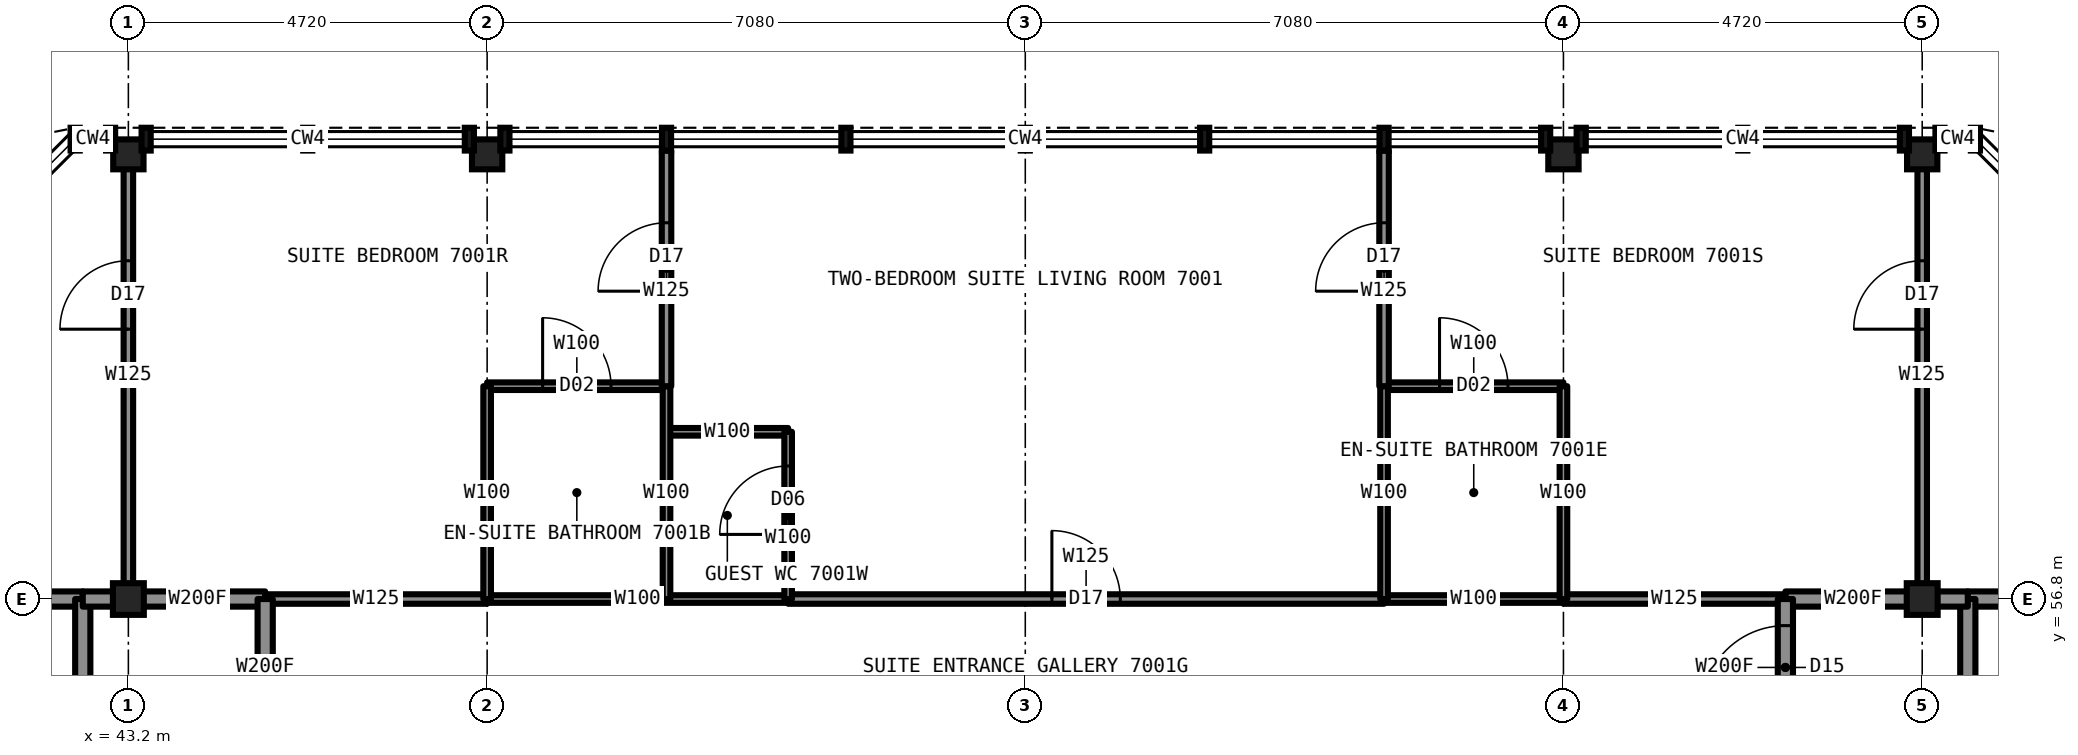
"""IFC4 building model, lengths in metres.
Left out: names, types, materials, properties, quantities, classifications, styles, units other than length and angle.
Written with IfcOpenShell. Run it as: python <this file> out.ifc"""

import sys

from ifc_helpers import new_model, si_unit, direction, frame, frame_2d, origin, origin_2d, place, context, subcontext, project, spatial, rectangle, i_section, extrude, element, fill, save


model = new_model("IFC4")
c1 = context("Model", 3, precision=1e-05, world=origin(), true_north=direction((0.0, 1.0)))
c2 = subcontext(c1, "Body", "Model", "MODEL_VIEW")
j1 = project(units=[si_unit("LENGTHUNIT", "METRE"), si_unit("PLANEANGLEUNIT", "RADIAN")], contexts=[c1])
p1 = place(None, origin())
s1 = spatial("IfcSite", under=j1, at=p1, CompositionType="ELEMENT")
p2 = place(p1, origin())
s2 = spatial("IfcBuilding", under=s1, at=p2, CompositionType="ELEMENT")
p3 = place(p2, frame((0.0, 0.0, 254.7)))
s3 = spatial("IfcBuildingStorey", under=s2, at=p3, CompositionType="ELEMENT", Elevation=254.7)
for number, where, z_axis, x_axis in (
    (1, (43.2, 62.65, 0.0), (0.0, 0.0, 1.0), (1.0, 0.0, 0.0)),
    (2, (47.92, 62.65, 0.0), (0.0, 0.0, 1.0), (1.0, 0.0, 0.0)),
    (3, (62.08, 62.65, 0.0), (0.0, 0.0, 1.0), (1.0, 0.0, 0.0)),
    (4, (66.8, 62.65, 0.0), (0.0, 0.0, 1.0), (1.0, 0.0, 0.0)),
):
    element("IfcColumn", number, at=place(p3, frame(where, z_axis=z_axis, x_axis=x_axis)), inside=s3, PredefinedType="COLUMN", context=c2, shape_type="SweptSolid", body=[
        extrude(i_section(OverallWidth=0.399, OverallDepth=0.394, WebThickness=0.023, FlangeThickness=0.037, at=origin_2d()), origin(), (0.0, 0.0, 1.0), 3.5),
    ])
for number, where, z_axis, x_axis in (
    (5, (43.2, 56.8, 0.0), (0.0, 0.0, 1.0), (1.0, 0.0, 0.0)),
    (6, (66.8, 56.8, 0.0), (0.0, 0.0, 1.0), (1.0, 0.0, 0.0)),
):
    element("IfcColumn", number, at=place(p3, frame(where, z_axis=z_axis, x_axis=x_axis)), inside=s3, PredefinedType="COLUMN", context=c2, shape_type="SweptSolid", body=[
        extrude(i_section(OverallWidth=0.406, OverallDepth=0.417, WebThickness=0.03, FlangeThickness=0.048, at=origin_2d()), origin(), (0.0, 0.0, 1.0), 3.5),
    ])
p4 = place(p3, frame((47.92, 56.8, 0.0), z_axis=(0.0, 0.0, 1.0), x_axis=(1.0, 0.0, 0.0)))
e7 = element("IfcWall", 7, at=p4, inside=s3, PredefinedType="PARTITIONING", context=c2, shape_type="SweptSolid", body=[
    extrude(rectangle(XDim=3.96, YDim=0.1, at=frame_2d((1.98, 0.0))), origin(), (0.0, 0.0, 1.0), 3.33),
])
p5 = place(p3, frame((59.72, 56.8, 0.0), z_axis=(0.0, 0.0, 1.0), x_axis=(1.0, 0.0, 0.0)))
e8 = element("IfcWall", 8, at=p5, inside=s3, PredefinedType="PARTITIONING", context=c2, shape_type="SweptSolid", body=[
    extrude(rectangle(XDim=2.36, YDim=0.1, at=frame_2d((1.18, 0.0))), origin(), (0.0, 0.0, 1.0), 3.33),
])
for number, where, z_axis, x_axis in (
    (9, (43.22, 56.8, 0.0), (0.0, 0.0, 1.0), (1.0, 0.0, 0.0)),
    (10, (65.0, 56.8, 0.0), (0.0, 0.0, 1.0), (1.0, 0.0, 0.0)),
):
    element("IfcWall", number, at=place(p3, frame(where, z_axis=z_axis, x_axis=x_axis)), inside=s3, PredefinedType="PARTITIONING", context=c2, shape_type="SweptSolid", body=[
        extrude(rectangle(XDim=1.78, YDim=0.2, at=frame_2d((0.89, 0.0))), origin(), (0.0, 0.0, 1.0), 3.33),
    ])
for number, where, z_axis, x_axis in (
    (11, (37.3, 56.8, 0.0), (0.0, 0.0, 1.0), (1.0, 0.0, 0.0)),
    (12, (67.4, 56.8, 0.0), (0.0, 0.0, 1.0), (1.0, 0.0, 0.0)),
):
    element("IfcWall", number, at=place(p3, frame(where, z_axis=z_axis, x_axis=x_axis)), inside=s3, PredefinedType="PARTITIONING", context=c2, shape_type="SweptSolid", body=[
        extrude(rectangle(XDim=5.3, YDim=0.2, at=frame_2d((2.65, 0.0))), origin(), (0.0, 0.0, 1.0), 2.573),
    ])
p6 = place(p3, frame((45.0, 56.8, 0.0), z_axis=(0.0, 0.0, 1.0), x_axis=(1.0, 0.0, 0.0)))
e13 = element("IfcWall", 13, at=p6, inside=s3, PredefinedType="PARTITIONING", context=c2, shape_type="SweptSolid", body=[
    extrude(rectangle(XDim=2.92, YDim=0.125, at=frame_2d((1.46, 0.0))), origin(), (0.0, 0.0, 1.0), 3.33),
])
p7 = place(p3, frame((51.88, 56.8, 0.0), z_axis=(0.0, 0.0, 1.0), x_axis=(1.0, 0.0, 0.0)))
e14 = element("IfcWall", 14, at=p7, inside=s3, PredefinedType="PARTITIONING", context=c2, shape_type="SweptSolid", body=[
    extrude(rectangle(XDim=7.84, YDim=0.125, at=frame_2d((3.92, 0.0))), origin(), (0.0, 0.0, 1.0), 3.33),
])
p8 = place(p7, frame((3.47, 0.0, 0.0)))
e15 = element("IfcOpeningElement", 15, at=p8, cuts=e14, PredefinedType="OPENING", context=c2, shape_type="SweptSolid", body=[
    extrude(rectangle(XDim=0.9, YDim=2.2, at=frame_2d((0.45, 1.1))), frame((0.0, 0.073, 0.0), z_axis=(0.0, -1.0, 0.0), x_axis=(1.0, 0.0, 0.0)), (0.0, 0.0, 1.0), 0.145),
])
p9 = place(p3, frame((62.08, 56.8, 0.0), z_axis=(0.0, 0.0, 1.0), x_axis=(1.0, 0.0, 0.0)))
e16 = element("IfcWall", 16, at=p9, inside=s3, PredefinedType="PARTITIONING", context=c2, shape_type="SweptSolid", body=[
    extrude(rectangle(XDim=2.92, YDim=0.125, at=frame_2d((1.46, 0.0))), origin(), (0.0, 0.0, 1.0), 3.33),
])
p10 = place(p3, frame((50.28, 59.0, 0.0), z_axis=(0.0, 0.0, 1.0), x_axis=(1.0, 0.0, 0.0)))
e17 = element("IfcWall", 17, at=p10, inside=s3, PredefinedType="PARTITIONING", context=c2, shape_type="SweptSolid", body=[
    extrude(rectangle(XDim=1.6, YDim=0.1, at=frame_2d((0.8, 0.0))), origin(), (0.0, 0.0, 1.0), 3.33),
])
p11 = place(p3, frame((47.92, 59.6, 0.0), z_axis=(0.0, 0.0, 1.0), x_axis=(1.0, 0.0, 0.0)))
e18 = element("IfcWall", 18, at=p11, inside=s3, PredefinedType="PARTITIONING", context=c2, shape_type="SweptSolid", body=[
    extrude(rectangle(XDim=2.36, YDim=0.1, at=frame_2d((1.18, 0.0))), origin(), (0.0, 0.0, 1.0), 3.33),
])
p12 = place(p11, frame((0.73, 0.0, 0.0)))
e19 = element("IfcOpeningElement", 19, at=p12, cuts=e18, PredefinedType="OPENING", context=c2, shape_type="SweptSolid", body=[
    extrude(rectangle(XDim=0.9, YDim=2.1, at=frame_2d((0.45, 1.05))), frame((0.0, 0.06, 0.0), z_axis=(0.0, -1.0, 0.0), x_axis=(1.0, 0.0, 0.0)), (0.0, 0.0, 1.0), 0.12),
])
p13 = place(p3, frame((59.72, 59.6, 0.0), z_axis=(0.0, 0.0, 1.0), x_axis=(1.0, 0.0, 0.0)))
e20 = element("IfcWall", 20, at=p13, inside=s3, PredefinedType="PARTITIONING", context=c2, shape_type="SweptSolid", body=[
    extrude(rectangle(XDim=2.36, YDim=0.1, at=frame_2d((1.18, 0.0))), origin(), (0.0, 0.0, 1.0), 3.33),
])
p14 = place(p13, frame((0.73, 0.0, 0.0)))
e21 = element("IfcOpeningElement", 21, at=p14, cuts=e20, PredefinedType="OPENING", context=c2, shape_type="SweptSolid", body=[
    extrude(rectangle(XDim=0.9, YDim=2.1, at=frame_2d((0.45, 1.05))), frame((0.0, 0.06, 0.0), z_axis=(0.0, -1.0, 0.0), x_axis=(1.0, 0.0, 0.0)), (0.0, 0.0, 1.0), 0.12),
])
p15 = place(p3, frame((45.0, 55.0, 0.0), z_axis=(0.0, 0.0, 1.0), x_axis=(0.0, 1.0, 0.0)))
e22 = element("IfcWall", 22, at=p15, inside=s3, PredefinedType="PARTITIONING", context=c2, shape_type="SweptSolid", body=[
    extrude(rectangle(XDim=1.8, YDim=0.2, at=frame_2d((0.9, 0.0))), origin(), (0.0, 0.0, 1.0), 3.33),
])
p16 = place(p3, frame((43.2, 56.8, 0.0), z_axis=(0.0, 0.0, 1.0), x_axis=(0.0, 1.0, 0.0)))
e23 = element("IfcWall", 23, at=p16, inside=s3, PredefinedType="PARTITIONING", context=c2, shape_type="SweptSolid", body=[
    extrude(rectangle(XDim=5.9, YDim=0.125, at=frame_2d((2.95, 0.0))), origin(), (0.0, 0.0, 1.0), 2.573),
])
p17 = place(p16, frame((3.55, 0.0, 0.0)))
e24 = element("IfcOpeningElement", 24, at=p17, cuts=e23, PredefinedType="OPENING", context=c2, shape_type="SweptSolid", body=[
    extrude(rectangle(XDim=0.9, YDim=2.2, at=frame_2d((0.45, 1.1))), frame((0.0, 0.073, 0.0), z_axis=(0.0, -1.0, 0.0), x_axis=(1.0, 0.0, 0.0)), (0.0, 0.0, 1.0), 0.145),
])
p18 = place(p3, frame((42.6, 33.2, 0.0), z_axis=(0.0, 0.0, 1.0), x_axis=(0.0, 1.0, 0.0)))
e25 = element("IfcWall", 25, at=p18, inside=s3, PredefinedType="PARTITIONING", context=c2, shape_type="SweptSolid", body=[
    extrude(rectangle(XDim=23.6, YDim=0.2, at=frame_2d((11.8, 0.0))), origin(), (0.0, 0.0, 1.0), 3.33),
])
p19 = place(p18, frame((8.95, 0.0, 0.0)))
e26 = element("IfcOpeningElement", 26, at=p19, cuts=e25, PredefinedType="OPENING", context=c2, shape_type="SweptSolid", body=[
    extrude(rectangle(XDim=1.1, YDim=2.2, at=frame_2d((0.55, 1.1))), frame((0.0, 0.11, 0.0), z_axis=(0.0, -1.0, 0.0), x_axis=(1.0, 0.0, 0.0)), (0.0, 0.0, 1.0), 0.22),
])
p20 = place(p3, frame((51.88, 56.8, 0.0), z_axis=(0.0, 0.0, 1.0), x_axis=(0.0, 1.0, 0.0)))
e27 = element("IfcWall", 27, at=p20, inside=s3, PredefinedType="PARTITIONING", context=c2, shape_type="SweptSolid", body=[
    extrude(rectangle(XDim=2.2, YDim=0.1, at=frame_2d((1.1, 0.0))), origin(), (0.0, 0.0, 1.0), 3.33),
])
p21 = place(p20, frame((0.85, 0.0, 0.0)))
e28 = element("IfcOpeningElement", 28, at=p21, cuts=e27, PredefinedType="OPENING", context=c2, shape_type="SweptSolid", body=[
    extrude(rectangle(XDim=0.9, YDim=2.1, at=frame_2d((0.45, 1.05))), frame((0.0, 0.06, 0.0), z_axis=(0.0, -1.0, 0.0), x_axis=(1.0, 0.0, 0.0)), (0.0, 0.0, 1.0), 0.12),
])
p22 = place(p3, frame((50.28, 56.8, 0.0), z_axis=(0.0, 0.0, 1.0), x_axis=(0.0, 1.0, 0.0)))
e29 = element("IfcWall", 29, at=p22, inside=s3, PredefinedType="PARTITIONING", context=c2, shape_type="SweptSolid", body=[
    extrude(rectangle(XDim=2.8, YDim=0.1, at=frame_2d((1.4, 0.0))), origin(), (0.0, 0.0, 1.0), 3.33),
])
p23 = place(p3, frame((50.28, 59.6, 0.0), z_axis=(0.0, 0.0, 1.0), x_axis=(0.0, 1.0, 0.0)))
e30 = element("IfcWall", 30, at=p23, inside=s3, PredefinedType="PARTITIONING", context=c2, shape_type="SweptSolid", body=[
    extrude(rectangle(XDim=3.1, YDim=0.125, at=frame_2d((1.55, 0.0))), origin(), (0.0, 0.0, 1.0), 3.33),
])
p24 = place(p23, frame((1.25, 0.0, 0.0)))
e31 = element("IfcOpeningElement", 31, at=p24, cuts=e30, PredefinedType="OPENING", context=c2, shape_type="SweptSolid", body=[
    extrude(rectangle(XDim=0.9, YDim=2.2, at=frame_2d((0.45, 1.1))), frame((0.0, 0.073, 0.0), z_axis=(0.0, -1.0, 0.0), x_axis=(1.0, 0.0, 0.0)), (0.0, 0.0, 1.0), 0.145),
])
p25 = place(p3, frame((47.92, 56.8, 0.0), z_axis=(0.0, 0.0, 1.0), x_axis=(0.0, 1.0, 0.0)))
e32 = element("IfcWall", 32, at=p25, inside=s3, PredefinedType="PARTITIONING", context=c2, shape_type="SweptSolid", body=[
    extrude(rectangle(XDim=2.8, YDim=0.1, at=frame_2d((1.4, 0.0))), origin(), (0.0, 0.0, 1.0), 2.573),
])
p26 = place(p3, frame((65.0, 55.0, 0.0), z_axis=(0.0, 0.0, 1.0), x_axis=(0.0, 1.0, 0.0)))
e33 = element("IfcWall", 33, at=p26, inside=s3, PredefinedType="PARTITIONING", context=c2, shape_type="SweptSolid", body=[
    extrude(rectangle(XDim=1.8, YDim=0.2, at=frame_2d((0.9, 0.0))), origin(), (0.0, 0.0, 1.0), 3.33),
])
p27 = place(p26, frame((0.35, 0.0, 0.0)))
e34 = element("IfcOpeningElement", 34, at=p27, cuts=e33, PredefinedType="OPENING", context=c2, shape_type="SweptSolid", body=[
    extrude(rectangle(XDim=1.1, YDim=2.2, at=frame_2d((0.55, 1.1))), frame((0.0, 0.11, 0.0), z_axis=(0.0, -1.0, 0.0), x_axis=(1.0, 0.0, 0.0)), (0.0, 0.0, 1.0), 0.22),
])
p28 = place(p3, frame((66.8, 56.8, 0.0), z_axis=(0.0, 0.0, 1.0), x_axis=(0.0, 1.0, 0.0)))
e35 = element("IfcWall", 35, at=p28, inside=s3, PredefinedType="PARTITIONING", context=c2, shape_type="SweptSolid", body=[
    extrude(rectangle(XDim=5.9, YDim=0.125, at=frame_2d((2.95, 0.0))), origin(), (0.0, 0.0, 1.0), 2.573),
])
p29 = place(p28, frame((3.55, 0.0, 0.0)))
e36 = element("IfcOpeningElement", 36, at=p29, cuts=e35, PredefinedType="OPENING", context=c2, shape_type="SweptSolid", body=[
    extrude(rectangle(XDim=0.9, YDim=2.2, at=frame_2d((0.45, 1.1))), frame((0.0, 0.073, 0.0), z_axis=(0.0, -1.0, 0.0), x_axis=(1.0, 0.0, 0.0)), (0.0, 0.0, 1.0), 0.145),
])
p30 = place(p3, frame((67.4, 33.2, 0.0), z_axis=(0.0, 0.0, 1.0), x_axis=(0.0, 1.0, 0.0)))
e37 = element("IfcWall", 37, at=p30, inside=s3, PredefinedType="PARTITIONING", context=c2, shape_type="SweptSolid", body=[
    extrude(rectangle(XDim=23.6, YDim=0.2, at=frame_2d((11.8, 0.0))), origin(), (0.0, 0.0, 1.0), 3.33),
])
p31 = place(p30, frame((8.95, 0.0, 0.0)))
e38 = element("IfcOpeningElement", 38, at=p31, cuts=e37, PredefinedType="OPENING", context=c2, shape_type="SweptSolid", body=[
    extrude(rectangle(XDim=1.1, YDim=2.2, at=frame_2d((0.55, 1.1))), frame((0.0, 0.11, 0.0), z_axis=(0.0, -1.0, 0.0), x_axis=(1.0, 0.0, 0.0)), (0.0, 0.0, 1.0), 0.22),
])
p32 = place(p3, frame((59.72, 56.8, 0.0), z_axis=(0.0, 0.0, 1.0), x_axis=(0.0, 1.0, 0.0)))
e39 = element("IfcWall", 39, at=p32, inside=s3, PredefinedType="PARTITIONING", context=c2, shape_type="SweptSolid", body=[
    extrude(rectangle(XDim=2.8, YDim=0.1, at=frame_2d((1.4, 0.0))), origin(), (0.0, 0.0, 1.0), 3.33),
])
p33 = place(p3, frame((59.72, 59.6, 0.0), z_axis=(0.0, 0.0, 1.0), x_axis=(0.0, 1.0, 0.0)))
e40 = element("IfcWall", 40, at=p33, inside=s3, PredefinedType="PARTITIONING", context=c2, shape_type="SweptSolid", body=[
    extrude(rectangle(XDim=3.1, YDim=0.125, at=frame_2d((1.55, 0.0))), origin(), (0.0, 0.0, 1.0), 3.33),
])
p34 = place(p33, frame((1.25, 0.0, 0.0)))
e41 = element("IfcOpeningElement", 41, at=p34, cuts=e40, PredefinedType="OPENING", context=c2, shape_type="SweptSolid", body=[
    extrude(rectangle(XDim=0.9, YDim=2.2, at=frame_2d((0.45, 1.1))), frame((0.0, 0.073, 0.0), z_axis=(0.0, -1.0, 0.0), x_axis=(1.0, 0.0, 0.0)), (0.0, 0.0, 1.0), 0.145),
])
p35 = place(p3, frame((62.08, 56.8, 0.0), z_axis=(0.0, 0.0, 1.0), x_axis=(0.0, 1.0, 0.0)))
e42 = element("IfcWall", 42, at=p35, inside=s3, PredefinedType="PARTITIONING", context=c2, shape_type="SweptSolid", body=[
    extrude(rectangle(XDim=2.8, YDim=0.1, at=frame_2d((1.4, 0.0))), origin(), (0.0, 0.0, 1.0), 2.573),
])
for number, where, z_axis, x_axis in (
    (43, (42.6, 56.8, 0.0), (0.0, 0.0, 1.0), (1.0, 0.0, 0.0)),
    (44, (66.78, 56.8, 0.0), (0.0, 0.0, 1.0), (1.0, 0.0, 0.0)),
):
    element("IfcWall", number, at=place(p3, frame(where, z_axis=z_axis, x_axis=x_axis)), inside=s3, PredefinedType="PARTITIONING", context=c2, shape_type="SweptSolid", body=[
        extrude(rectangle(XDim=0.62, YDim=0.2, at=frame_2d((0.31, 0.0))), origin(), (0.0, 0.0, 1.0), 2.573),
    ])
p36 = place(p8, origin())
e45 = element("IfcDoor", 45, at=p36, inside=s3, OperationType="SINGLE_SWING_LEFT", PredefinedType="DOOR", context=c2, shape_type="SweptSolid", body=[
    extrude(rectangle(XDim=0.9, YDim=2.2, at=frame_2d((0.45, 1.1))), frame((0.0, 0.025, 0.0), z_axis=(0.0, -1.0, 0.0), x_axis=(1.0, 0.0, 0.0)), (0.0, 0.0, 1.0), 0.05),
])
fill(e15, e45)
p37 = place(p12, origin())
e46 = element("IfcDoor", 46, at=p37, inside=s3, OperationType="SINGLE_SWING_RIGHT", PredefinedType="DOOR", context=c2, shape_type="SweptSolid", body=[
    extrude(rectangle(XDim=0.9, YDim=2.1, at=frame_2d((0.45, 1.05))), frame((0.0, 0.025, 0.0), z_axis=(0.0, -1.0, 0.0), x_axis=(1.0, 0.0, 0.0)), (0.0, 0.0, 1.0), 0.05),
])
fill(e19, e46)
p38 = place(p14, origin())
e47 = element("IfcDoor", 47, at=p38, inside=s3, OperationType="SINGLE_SWING_RIGHT", PredefinedType="DOOR", context=c2, shape_type="SweptSolid", body=[
    extrude(rectangle(XDim=0.9, YDim=2.1, at=frame_2d((0.45, 1.05))), frame((0.0, 0.025, 0.0), z_axis=(0.0, -1.0, 0.0), x_axis=(1.0, 0.0, 0.0)), (0.0, 0.0, 1.0), 0.05),
])
fill(e21, e47)
p39 = place(p27, origin())
e48 = element("IfcDoor", 48, at=p39, inside=s3, OperationType="SINGLE_SWING_LEFT", PredefinedType="DOOR", context=c2, shape_type="SweptSolid", body=[
    extrude(rectangle(XDim=1.1, YDim=2.2, at=frame_2d((0.55, 1.1))), frame((0.0, 0.025, 0.0), z_axis=(0.0, -1.0, 0.0), x_axis=(1.0, 0.0, 0.0)), (0.0, 0.0, 1.0), 0.05),
])
fill(e34, e48)
p40 = place(p24, origin())
e49 = element("IfcDoor", 49, at=p40, inside=s3, OperationType="SINGLE_SWING_LEFT", PredefinedType="DOOR", context=c2, shape_type="SweptSolid", body=[
    extrude(rectangle(XDim=0.9, YDim=2.2, at=frame_2d((0.45, 1.1))), frame((0.0, 0.025, 0.0), z_axis=(0.0, -1.0, 0.0), x_axis=(1.0, 0.0, 0.0)), (0.0, 0.0, 1.0), 0.05),
])
fill(e31, e49)
p41 = place(p34, origin())
e50 = element("IfcDoor", 50, at=p41, inside=s3, OperationType="SINGLE_SWING_LEFT", PredefinedType="DOOR", context=c2, shape_type="SweptSolid", body=[
    extrude(rectangle(XDim=0.9, YDim=2.2, at=frame_2d((0.45, 1.1))), frame((0.0, 0.025, 0.0), z_axis=(0.0, -1.0, 0.0), x_axis=(1.0, 0.0, 0.0)), (0.0, 0.0, 1.0), 0.05),
])
fill(e41, e50)
p42 = place(p17, origin())
e51 = element("IfcDoor", 51, at=p42, inside=s3, OperationType="SINGLE_SWING_LEFT", PredefinedType="DOOR", context=c2, shape_type="SweptSolid", body=[
    extrude(rectangle(XDim=0.9, YDim=2.2, at=frame_2d((0.45, 1.1))), frame((0.0, 0.025, 0.0), z_axis=(0.0, -1.0, 0.0), x_axis=(1.0, 0.0, 0.0)), (0.0, 0.0, 1.0), 0.05),
])
fill(e24, e51)
p43 = place(p29, origin())
e52 = element("IfcDoor", 52, at=p43, inside=s3, OperationType="SINGLE_SWING_LEFT", PredefinedType="DOOR", context=c2, shape_type="SweptSolid", body=[
    extrude(rectangle(XDim=0.9, YDim=2.2, at=frame_2d((0.45, 1.1))), frame((0.0, 0.025, 0.0), z_axis=(0.0, -1.0, 0.0), x_axis=(1.0, 0.0, 0.0)), (0.0, 0.0, 1.0), 0.05),
])
fill(e36, e52)
p44 = place(p21, origin())
e53 = element("IfcDoor", 53, at=p44, inside=s3, OperationType="SINGLE_SWING_LEFT", PredefinedType="DOOR", context=c2, shape_type="SweptSolid", body=[
    extrude(rectangle(XDim=0.9, YDim=2.1, at=frame_2d((0.45, 1.05))), frame((0.0, 0.025, 0.0), z_axis=(0.0, -1.0, 0.0), x_axis=(1.0, 0.0, 0.0)), (0.0, 0.0, 1.0), 0.05),
])
fill(e28, e53)
save(model, sys.argv[1])
